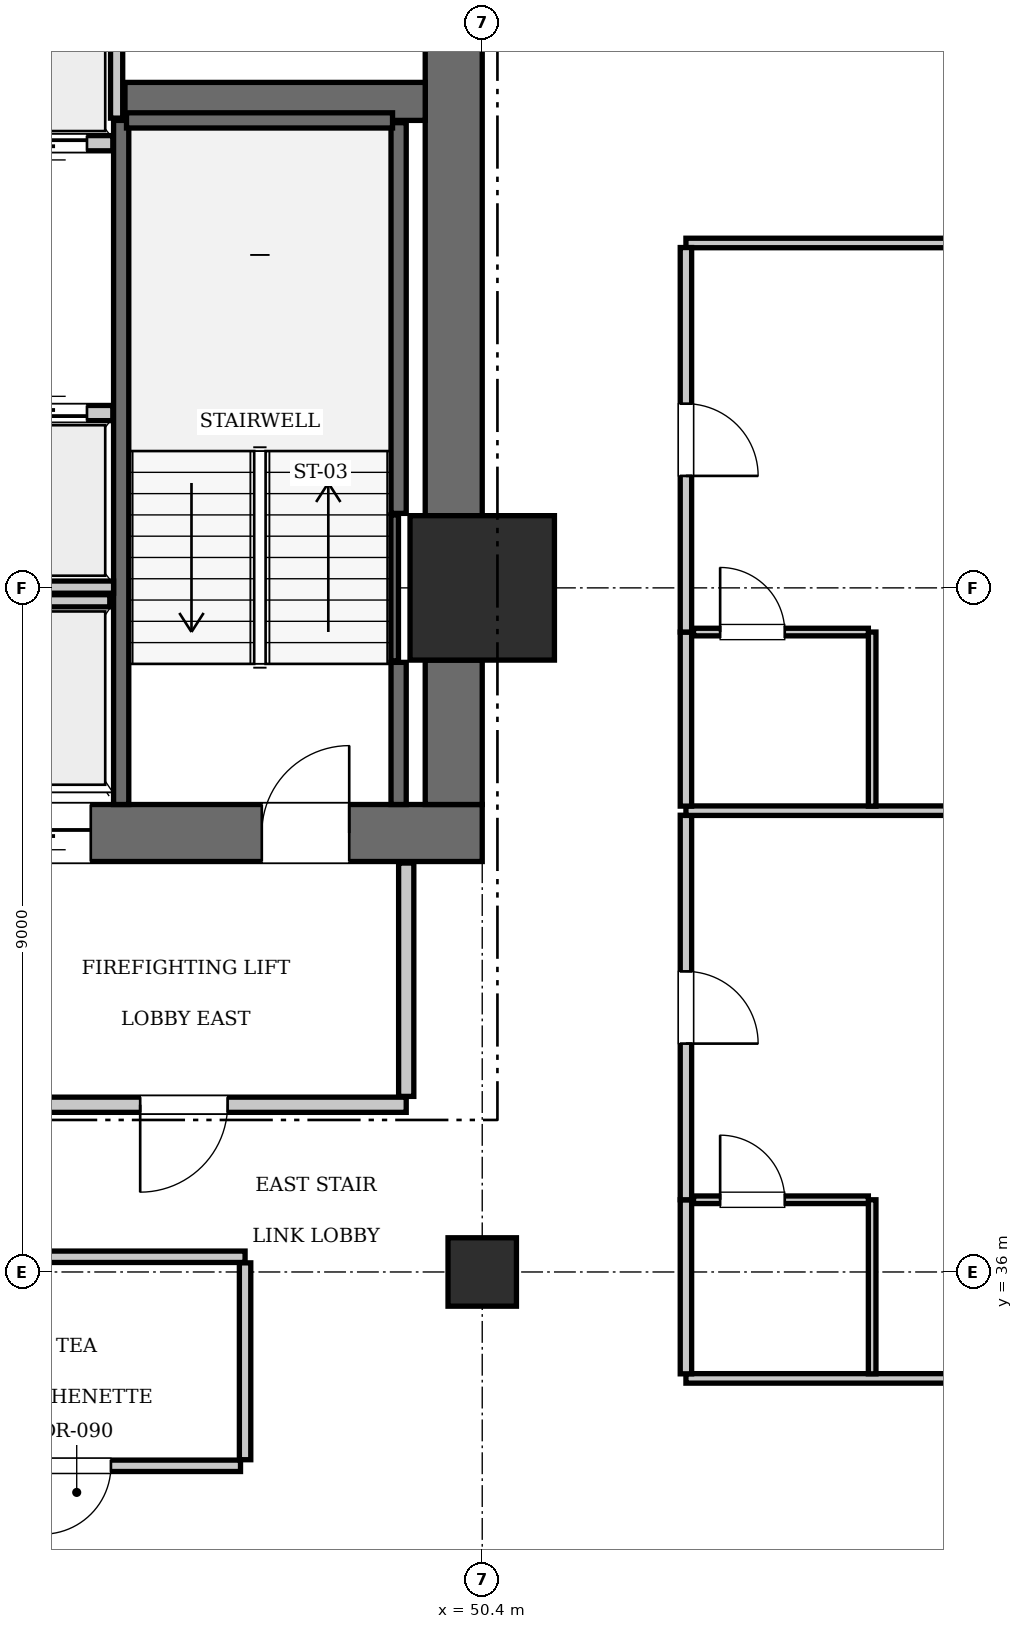
"""IFC4 building model, lengths in metres.
Left out: names, types, materials, properties, quantities, classifications, styles, units other than length and angle.
Written with IfcOpenShell. Run it as: python <this file> out.ifc"""

import sys

from ifc_helpers import new_model, si_unit, direction, frame, frame_2d, origin, origin_2d, place, context, subcontext, project, spatial, rectangle, extrude, element, fill, save


model = new_model("IFC4")
c1 = context("Model", 3, precision=1e-05, world=origin(), true_north=direction((0.0, 1.0)))
c2 = subcontext(c1, "Body", "Model", "MODEL_VIEW")
j1 = project(units=[si_unit("LENGTHUNIT", "METRE"), si_unit("PLANEANGLEUNIT", "RADIAN")], contexts=[c1])
p1 = place(None, origin())
s1 = spatial("IfcSite", under=j1, at=p1, CompositionType="ELEMENT")
p2 = place(p1, origin())
s2 = spatial("IfcBuilding", under=s1, at=p2, CompositionType="ELEMENT")
p3 = place(p2, frame((0.0, 0.0, 154.35)))
s3 = spatial("IfcBuildingStorey", under=s2, at=p3, CompositionType="ELEMENT", Elevation=154.35)
p4 = place(p3, frame((50.4, 45.0, 0.0), z_axis=(0.0, 0.0, 1.0), x_axis=(1.0, 0.0, 0.0)))
e1 = element("IfcColumn", 1, at=p4, inside=s3, PredefinedType="COLUMN", context=c2, shape_type="SweptSolid", body=[
    extrude(rectangle(XDim=1.9, YDim=1.9, at=origin_2d()), origin(), (0.0, 0.0, 1.0), 3.85),
])
p5 = place(p3, frame((43.6, 41.775, 0.0), z_axis=(0.0, 0.0, 1.0), x_axis=(1.0, 0.0, 0.0)))
e2 = element("IfcWall", 2, at=p5, inside=s3, PredefinedType="SHEAR", context=c2, shape_type="SweptSolid", body=[
    extrude(rectangle(XDim=6.8, YDim=0.75, at=frame_2d((3.4, 0.0))), origin(), (0.0, 0.0, 1.0), 3.85),
])
p6 = place(p5, frame((3.9, 0.0, 0.0)))
e3 = element("IfcOpeningElement", 3, at=p6, cuts=e2, PredefinedType="OPENING", context=c2, shape_type="SweptSolid", body=[
    extrude(rectangle(XDim=1.15, YDim=2.15, at=frame_2d((0.575, 1.075))), frame((0.0, 0.385, 0.0), z_axis=(0.0, -1.0, 0.0), x_axis=(1.0, 0.0, 0.0)), (0.0, 0.0, 1.0), 0.77),
])
p7 = place(p5, frame((0.55, 0.0, 0.0)))
e4 = element("IfcOpeningElement", 4, at=p7, cuts=e2, PredefinedType="OPENING", context=c2, shape_type="SweptSolid", body=[
    extrude(rectangle(XDim=1.1, YDim=2.2, at=frame_2d((0.55, 1.1))), frame((0.0, 0.385, 0.0), z_axis=(0.0, -1.0, 0.0), x_axis=(1.0, 0.0, 0.0)), (0.0, 0.0, 1.0), 0.77),
])
p8 = place(p3, frame((50.025, 42.15, 0.0), z_axis=(0.0, 0.0, 1.0), x_axis=(0.0, 1.0, 0.0)))
e5 = element("IfcWall", 5, at=p8, inside=s3, PredefinedType="SHEAR", context=c2, shape_type="SweptSolid", body=[
    extrude(rectangle(XDim=1.9, YDim=0.75, at=frame_2d((0.95, 0.0))), origin(), (0.0, 0.0, 1.0), 3.85),
])
p9 = place(p3, frame((50.025, 45.95, 0.0), z_axis=(0.0, 0.0, 1.0), x_axis=(0.0, 1.0, 0.0)))
e6 = element("IfcWall", 6, at=p9, inside=s3, PredefinedType="SHEAR", context=c2, shape_type="SweptSolid", body=[
    extrude(rectangle(XDim=7.3, YDim=0.75, at=frame_2d((3.65, 0.0))), origin(), (0.0, 0.0, 1.0), 3.85),
])
p10 = place(p3, frame((45.7, 51.4, 0.0), z_axis=(0.0, 0.0, 1.0), x_axis=(1.0, 0.0, 0.0)))
e7 = element("IfcWall", 7, at=p10, inside=s3, PredefinedType="SHEAR", context=c2, shape_type="SweptSolid", body=[
    extrude(rectangle(XDim=3.95, YDim=0.5, at=frame_2d((1.975, 0.0))), origin(), (0.0, 0.0, 1.0), 3.85),
])
p11 = place(p3, frame((50.4, 36.0, 0.0), z_axis=(0.0, 0.0, 1.0), x_axis=(1.0, 0.0, 0.0)))
e8 = element("IfcColumn", 8, at=p11, inside=s3, PredefinedType="COLUMN", context=c2, shape_type="SweptSolid", body=[
    extrude(rectangle(XDim=0.9, YDim=0.9, at=origin_2d()), origin(), (0.0, 0.0, 1.0), 3.85),
])
p12 = place(p3, frame((45.65, 42.15, 0.0), z_axis=(0.0, 0.0, 1.0), x_axis=(0.0, 1.0, 0.0)))
e9 = element("IfcWall", 9, at=p12, inside=s3, PredefinedType="SOLIDWALL", context=c2, shape_type="SweptSolid", body=[
    extrude(rectangle(XDim=9.0, YDim=0.2, at=frame_2d((4.5, 0.0))), origin(), (0.0, 0.0, 1.0), 3.61),
])
p13 = place(p3, frame((49.3, 42.15, 0.0), z_axis=(0.0, 0.0, 1.0), x_axis=(0.0, 1.0, 0.0)))
e10 = element("IfcWall", 10, at=p13, inside=s3, PredefinedType="SOLIDWALL", context=c2, shape_type="SweptSolid", body=[
    extrude(rectangle(XDim=1.87, YDim=0.2, at=frame_2d((0.935, 0.0))), origin(), (0.0, 0.0, 1.0), 3.61),
])
p14 = place(p3, frame((49.3, 45.98, 0.0), z_axis=(0.0, 0.0, 1.0), x_axis=(0.0, 1.0, 0.0)))
e11 = element("IfcWall", 11, at=p14, inside=s3, PredefinedType="SOLIDWALL", context=c2, shape_type="SweptSolid", body=[
    extrude(rectangle(XDim=5.14, YDim=0.2, at=frame_2d((2.57, 0.0))), origin(), (0.0, 0.0, 1.0), 3.61),
])
p15 = place(p3, frame((45.72, 51.15, 0.0), z_axis=(0.0, 0.0, 1.0), x_axis=(1.0, 0.0, 0.0)))
e12 = element("IfcWall", 12, at=p15, inside=s3, PredefinedType="SOLIDWALL", context=c2, shape_type="SweptSolid", body=[
    extrude(rectangle(XDim=3.5, YDim=0.2, at=frame_2d((1.75, 0.0))), origin(), (0.0, 0.0, 1.0), 3.61),
])
p16 = place(p3, frame((49.248, 44.04, 0.0), z_axis=(0.0, 0.0, 1.0), x_axis=(0.0, 1.0, 0.0)))
e13 = element("IfcWall", 13, at=p16, inside=s3, PredefinedType="SOLIDWALL", context=c2, shape_type="SweptSolid", body=[
    extrude(rectangle(XDim=1.92, YDim=0.1, at=frame_2d((0.96, 0.0))), origin(), (0.0, 0.0, 1.0), 3.61),
])
p17 = place(p3, frame((43.86, 47.3, 0.0), z_axis=(0.0, 0.0, 1.0), x_axis=(1.0, 0.0, 0.0)))
e14 = element("IfcWall", 14, at=p17, inside=s3, PredefinedType="SOLIDWALL", context=c2, shape_type="SweptSolid", body=[
    extrude(rectangle(XDim=1.68, YDim=0.2, at=frame_2d((0.84, 0.0))), origin(), (0.0, 0.0, 1.0), 3.61),
])
p18 = place(p17, frame((0.34, 0.0, 0.0)))
e15 = element("IfcOpeningElement", 15, at=p18, cuts=e14, PredefinedType="OPENING", context=c2, shape_type="SweptSolid", body=[
    extrude(rectangle(XDim=1.0, YDim=2.15, at=frame_2d((0.5, 1.075))), frame((0.0, 0.11, 0.0), z_axis=(0.0, -1.0, 0.0), x_axis=(1.0, 0.0, 0.0)), (0.0, 0.0, 1.0), 0.22),
])
p19 = place(p3, frame((43.86, 50.85, 0.0), z_axis=(0.0, 0.0, 1.0), x_axis=(1.0, 0.0, 0.0)))
e16 = element("IfcWall", 16, at=p19, inside=s3, PredefinedType="SOLIDWALL", context=c2, shape_type="SweptSolid", body=[
    extrude(rectangle(XDim=1.68, YDim=0.2, at=frame_2d((0.84, 0.0))), origin(), (0.0, 0.0, 1.0), 3.61),
])
p20 = place(p19, frame((0.34, 0.0, 0.0)))
e17 = element("IfcOpeningElement", 17, at=p20, cuts=e16, PredefinedType="OPENING", context=c2, shape_type="SweptSolid", body=[
    extrude(rectangle(XDim=1.0, YDim=2.15, at=frame_2d((0.5, 1.075))), frame((0.0, 0.11, 0.0), z_axis=(0.0, -1.0, 0.0), x_axis=(1.0, 0.0, 0.0)), (0.0, 0.0, 1.0), 0.22),
])
p21 = place(p3, frame((43.9, 44.83, 0.0), z_axis=(0.0, 0.0, 1.0), x_axis=(1.0, 0.0, 0.0)))
e18 = element("IfcWall", 18, at=p21, inside=s3, PredefinedType="SOLIDWALL", context=c2, shape_type="SweptSolid", body=[
    extrude(rectangle(XDim=1.6, YDim=0.16, at=frame_2d((0.8, 0.0))), origin(), (0.0, 0.0, 1.0), 3.61),
])
p22 = place(p3, frame((42.1, 45.01, 0.0), z_axis=(0.0, 0.0, 1.0), x_axis=(1.0, 0.0, 0.0)))
e19 = element("IfcWall", 19, at=p22, inside=s3, PredefinedType="SOLIDWALL", context=c2, shape_type="SweptSolid", body=[
    extrude(rectangle(XDim=3.45, YDim=0.16, at=frame_2d((1.725, 0.0))), origin(), (0.0, 0.0, 1.0), 3.61),
])
p23 = place(p3, frame((45.59, 51.18, 0.0), z_axis=(0.0, 0.0, 1.0), x_axis=(0.0, 1.0, 0.0)))
e20 = element("IfcWall", 20, at=p23, inside=s3, PredefinedType="SOLIDWALL", context=c2, shape_type="SweptSolid", body=[
    extrude(rectangle(XDim=2.07, YDim=0.16, at=frame_2d((1.035, 0.0))), origin(), (0.0, 0.0, 1.0), 3.61),
])
p24 = place(p3, frame((43.6, 38.2, 0.0), z_axis=(0.0, 0.0, 1.0), x_axis=(1.0, 0.0, 0.0)))
e21 = element("IfcWall", 21, at=p24, inside=s3, PredefinedType="PARTITIONING", context=c2, shape_type="SweptSolid", body=[
    extrude(rectangle(XDim=5.8, YDim=0.2, at=frame_2d((2.9, 0.0))), origin(), (0.0, 0.0, 1.0), 3.61),
])
p25 = place(p24, frame((2.3, 0.0, 0.0)))
e22 = element("IfcOpeningElement", 22, at=p25, cuts=e21, PredefinedType="OPENING", context=c2, shape_type="SweptSolid", body=[
    extrude(rectangle(XDim=1.15, YDim=2.15, at=frame_2d((0.575, 1.075))), frame((0.0, 0.11, 0.0), z_axis=(0.0, -1.0, 0.0), x_axis=(1.0, 0.0, 0.0)), (0.0, 0.0, 1.0), 0.22),
])
p26 = place(p3, frame((49.4, 38.31, 0.0), z_axis=(0.0, 0.0, 1.0), x_axis=(0.0, 1.0, 0.0)))
e23 = element("IfcWall", 23, at=p26, inside=s3, PredefinedType="PARTITIONING", context=c2, shape_type="SweptSolid", body=[
    extrude(rectangle(XDim=3.07, YDim=0.2, at=frame_2d((1.535, 0.0))), origin(), (0.0, 0.0, 1.0), 3.61),
])
p27 = place(p3, frame((42.85, 36.2, 0.0), z_axis=(0.0, 0.0, 1.0), x_axis=(1.0, 0.0, 0.0)))
e24 = element("IfcWall", 24, at=p27, inside=s3, PredefinedType="PARTITIONING", context=c2, shape_type="SweptSolid", body=[
    extrude(rectangle(XDim=4.43, YDim=0.15, at=frame_2d((2.215, 0.0))), origin(), (0.0, 0.0, 1.0), 3.61),
])
p28 = place(p3, frame((47.28, 33.53, 0.0), z_axis=(0.0, 0.0, 1.0), x_axis=(0.0, 1.0, 0.0)))
e25 = element("IfcWall", 25, at=p28, inside=s3, PredefinedType="PARTITIONING", context=c2, shape_type="SweptSolid", body=[
    extrude(rectangle(XDim=2.59, YDim=0.15, at=frame_2d((1.295, 0.0))), origin(), (0.0, 0.0, 1.0), 3.61),
])
p29 = place(p3, frame((42.91, 33.45, 0.0), z_axis=(0.0, 0.0, 1.0), x_axis=(1.0, 0.0, 0.0)))
e26 = element("IfcWall", 26, at=p29, inside=s3, PredefinedType="PARTITIONING", context=c2, shape_type="SweptSolid", body=[
    extrude(rectangle(XDim=4.31, YDim=0.15, at=frame_2d((2.155, 0.0))), origin(), (0.0, 0.0, 1.0), 3.61),
])
p30 = place(p29, frame((1.705, 0.0, 0.0)))
e27 = element("IfcOpeningElement", 27, at=p30, cuts=e26, PredefinedType="OPENING", context=c2, shape_type="SweptSolid", body=[
    extrude(rectangle(XDim=0.9, YDim=2.1, at=frame_2d((0.45, 1.05))), frame((0.0, 0.085, 0.0), z_axis=(0.0, -1.0, 0.0), x_axis=(1.0, 0.0, 0.0)), (0.0, 0.0, 1.0), 0.17),
])
p31 = place(p3, frame((53.08, 34.6, 0.0), z_axis=(0.0, 0.0, 1.0), x_axis=(1.0, 0.0, 0.0)))
e28 = element("IfcWall", 28, at=p31, inside=s3, PredefinedType="PARTITIONING", context=c2, shape_type="SweptSolid", body=[
    extrude(rectangle(XDim=9.32, YDim=0.125, at=frame_2d((4.66, 0.0))), origin(), (0.0, 0.0, 1.0), 3.61),
])
p32 = place(p3, frame((53.08, 49.538, 0.0), z_axis=(0.0, 0.0, 1.0), x_axis=(1.0, 0.0, 0.0)))
e29 = element("IfcWall", 29, at=p32, inside=s3, PredefinedType="PARTITIONING", context=c2, shape_type="SweptSolid", body=[
    extrude(rectangle(XDim=5.28, YDim=0.125, at=frame_2d((2.64, 0.0))), origin(), (0.0, 0.0, 1.0), 3.61),
])
p33 = place(p3, frame((53.08, 34.66, 0.0), z_axis=(0.0, 0.0, 1.0), x_axis=(0.0, 1.0, 0.0)))
e30 = element("IfcWall", 30, at=p33, inside=s3, PredefinedType="PARTITIONING", context=c2, shape_type="SweptSolid", body=[
    extrude(rectangle(XDim=2.29, YDim=0.15, at=frame_2d((1.145, 0.0))), origin(), (0.0, 0.0, 1.0), 3.61),
])
p34 = place(p3, frame((53.08, 36.95, 0.0), z_axis=(0.0, 0.0, 1.0), x_axis=(0.0, 1.0, 0.0)))
e31 = element("IfcWall", 31, at=p34, inside=s3, PredefinedType="PARTITIONING", context=c2, shape_type="SweptSolid", body=[
    extrude(rectangle(XDim=5.059, YDim=0.15, at=frame_2d((2.529, 0.0))), origin(), (0.0, 0.0, 1.0), 3.61),
])
p35 = place(p34, frame((2.054, 0.0, 0.0)))
e32 = element("IfcOpeningElement", 32, at=p35, cuts=e31, PredefinedType="OPENING", context=c2, shape_type="SweptSolid", body=[
    extrude(rectangle(XDim=0.95, YDim=2.15, at=frame_2d((0.475, 1.075))), frame((0.0, 0.085, 0.0), z_axis=(0.0, -1.0, 0.0), x_axis=(1.0, 0.0, 0.0)), (0.0, 0.0, 1.0), 0.17),
])
p36 = place(p3, frame((55.53, 34.66, 0.0), z_axis=(0.0, 0.0, 1.0), x_axis=(0.0, 1.0, 0.0)))
e33 = element("IfcWall", 33, at=p36, inside=s3, PredefinedType="PARTITIONING", context=c2, shape_type="SweptSolid", body=[
    extrude(rectangle(XDim=2.29, YDim=0.1, at=frame_2d((1.145, 0.0))), origin(), (0.0, 0.0, 1.0), 3.61),
])
p37 = place(p3, frame((53.18, 36.95, 0.0), z_axis=(0.0, 0.0, 1.0), x_axis=(1.0, 0.0, 0.0)))
e34 = element("IfcWall", 34, at=p37, inside=s3, PredefinedType="PARTITIONING", context=c2, shape_type="SweptSolid", body=[
    extrude(rectangle(XDim=2.3, YDim=0.1, at=frame_2d((1.15, 0.0))), origin(), (0.0, 0.0, 1.0), 3.61),
])
p38 = place(p37, frame((0.35, 0.0, 0.0)))
e35 = element("IfcOpeningElement", 35, at=p38, cuts=e34, PredefinedType="OPENING", context=c2, shape_type="SweptSolid", body=[
    extrude(rectangle(XDim=0.85, YDim=2.1, at=frame_2d((0.425, 1.05))), frame((0.0, 0.06, 0.0), z_axis=(0.0, -1.0, 0.0), x_axis=(1.0, 0.0, 0.0)), (0.0, 0.0, 1.0), 0.12),
])
p39 = place(p3, frame((53.08, 42.069, 0.0), z_axis=(0.0, 0.0, 1.0), x_axis=(1.0, 0.0, 0.0)))
e36 = element("IfcWall", 36, at=p39, inside=s3, PredefinedType="PARTITIONING", context=c2, shape_type="SweptSolid", body=[
    extrude(rectangle(XDim=9.32, YDim=0.125, at=frame_2d((4.66, 0.0))), origin(), (0.0, 0.0, 1.0), 3.61),
])
p40 = place(p3, frame((53.08, 42.129, 0.0), z_axis=(0.0, 0.0, 1.0), x_axis=(0.0, 1.0, 0.0)))
e37 = element("IfcWall", 37, at=p40, inside=s3, PredefinedType="PARTITIONING", context=c2, shape_type="SweptSolid", body=[
    extrude(rectangle(XDim=2.29, YDim=0.15, at=frame_2d((1.145, 0.0))), origin(), (0.0, 0.0, 1.0), 3.61),
])
p41 = place(p3, frame((53.08, 44.419, 0.0), z_axis=(0.0, 0.0, 1.0), x_axis=(0.0, 1.0, 0.0)))
e38 = element("IfcWall", 38, at=p41, inside=s3, PredefinedType="PARTITIONING", context=c2, shape_type="SweptSolid", body=[
    extrude(rectangle(XDim=5.059, YDim=0.15, at=frame_2d((2.529, 0.0))), origin(), (0.0, 0.0, 1.0), 3.61),
])
p42 = place(p41, frame((2.054, 0.0, 0.0)))
e39 = element("IfcOpeningElement", 39, at=p42, cuts=e38, PredefinedType="OPENING", context=c2, shape_type="SweptSolid", body=[
    extrude(rectangle(XDim=0.95, YDim=2.15, at=frame_2d((0.475, 1.075))), frame((0.0, 0.085, 0.0), z_axis=(0.0, -1.0, 0.0), x_axis=(1.0, 0.0, 0.0)), (0.0, 0.0, 1.0), 0.17),
])
p43 = place(p3, frame((55.53, 42.129, 0.0), z_axis=(0.0, 0.0, 1.0), x_axis=(0.0, 1.0, 0.0)))
e40 = element("IfcWall", 40, at=p43, inside=s3, PredefinedType="PARTITIONING", context=c2, shape_type="SweptSolid", body=[
    extrude(rectangle(XDim=2.29, YDim=0.1, at=frame_2d((1.145, 0.0))), origin(), (0.0, 0.0, 1.0), 3.61),
])
p44 = place(p3, frame((53.18, 44.419, 0.0), z_axis=(0.0, 0.0, 1.0), x_axis=(1.0, 0.0, 0.0)))
e41 = element("IfcWall", 41, at=p44, inside=s3, PredefinedType="PARTITIONING", context=c2, shape_type="SweptSolid", body=[
    extrude(rectangle(XDim=2.3, YDim=0.1, at=frame_2d((1.15, 0.0))), origin(), (0.0, 0.0, 1.0), 3.61),
])
p45 = place(p44, frame((0.35, 0.0, 0.0)))
e42 = element("IfcOpeningElement", 42, at=p45, cuts=e41, PredefinedType="OPENING", context=c2, shape_type="SweptSolid", body=[
    extrude(rectangle(XDim=0.85, YDim=2.1, at=frame_2d((0.425, 1.05))), frame((0.0, 0.06, 0.0), z_axis=(0.0, -1.0, 0.0), x_axis=(1.0, 0.0, 0.0)), (0.0, 0.0, 1.0), 0.12),
])
p46 = place(p6, origin())
e43 = element("IfcDoor", 43, at=p46, inside=s3, OperationType="SINGLE_SWING_RIGHT", PredefinedType="DOOR", context=c2, shape_type="SweptSolid", body=[
    extrude(rectangle(XDim=1.15, YDim=2.15, at=frame_2d((0.575, 1.075))), frame((0.0, 0.025, 0.0), z_axis=(0.0, -1.0, 0.0), x_axis=(1.0, 0.0, 0.0)), (0.0, 0.0, 1.0), 0.05),
])
fill(e3, e43)
p47 = place(p18, origin())
e44 = element("IfcDoor", 44, at=p47, inside=s3, OperationType="SLIDING_TO_LEFT", PredefinedType="DOOR", context=c2, shape_type="SweptSolid", body=[
    extrude(rectangle(XDim=1.0, YDim=2.15, at=frame_2d((0.5, 1.075))), frame((0.0, 0.025, 0.0), z_axis=(0.0, -1.0, 0.0), x_axis=(1.0, 0.0, 0.0)), (0.0, 0.0, 1.0), 0.05),
])
fill(e15, e44)
p48 = place(p20, frame((1.0, 0.0, 0.0), z_axis=(0.0, 0.0, 1.0), x_axis=(-1.0, 0.0, 0.0)))
e45 = element("IfcDoor", 45, at=p48, inside=s3, OperationType="SLIDING_TO_LEFT", PredefinedType="DOOR", context=c2, shape_type="SweptSolid", body=[
    extrude(rectangle(XDim=1.0, YDim=2.15, at=frame_2d((0.5, 1.075))), frame((0.0, 0.025, 0.0), z_axis=(0.0, -1.0, 0.0), x_axis=(1.0, 0.0, 0.0)), (0.0, 0.0, 1.0), 0.05),
])
fill(e17, e45)
p49 = place(p7, frame((1.1, 0.0, 0.0), z_axis=(0.0, 0.0, 1.0), x_axis=(-1.0, 0.0, 0.0)))
e46 = element("IfcDoor", 46, at=p49, inside=s3, OperationType="SLIDING_TO_LEFT", PredefinedType="DOOR", context=c2, shape_type="SweptSolid", body=[
    extrude(rectangle(XDim=1.1, YDim=2.2, at=frame_2d((0.55, 1.1))), frame((0.0, 0.025, 0.0), z_axis=(0.0, -1.0, 0.0), x_axis=(1.0, 0.0, 0.0)), (0.0, 0.0, 1.0), 0.05),
])
fill(e4, e46)
p50 = place(p25, frame((1.15, 0.0, 0.0), z_axis=(0.0, 0.0, 1.0), x_axis=(-1.0, 0.0, 0.0)))
e47 = element("IfcDoor", 47, at=p50, inside=s3, OperationType="SINGLE_SWING_RIGHT", PredefinedType="DOOR", context=c2, shape_type="SweptSolid", body=[
    extrude(rectangle(XDim=1.15, YDim=2.15, at=frame_2d((0.575, 1.075))), frame((0.0, 0.025, 0.0), z_axis=(0.0, -1.0, 0.0), x_axis=(1.0, 0.0, 0.0)), (0.0, 0.0, 1.0), 0.05),
])
fill(e22, e47)
p51 = place(p30, frame((0.9, 0.0, 0.0), z_axis=(0.0, 0.0, 1.0), x_axis=(-1.0, 0.0, 0.0)))
e48 = element("IfcDoor", 48, at=p51, inside=s3, OperationType="SINGLE_SWING_RIGHT", PredefinedType="DOOR", context=c2, shape_type="SweptSolid", body=[
    extrude(rectangle(XDim=0.9, YDim=2.1, at=frame_2d((0.45, 1.05))), frame((0.0, 0.025, 0.0), z_axis=(0.0, -1.0, 0.0), x_axis=(1.0, 0.0, 0.0)), (0.0, 0.0, 1.0), 0.05),
])
fill(e27, e48)
p52 = place(p38, origin())
e49 = element("IfcDoor", 49, at=p52, inside=s3, OperationType="SINGLE_SWING_LEFT", PredefinedType="DOOR", context=c2, shape_type="SweptSolid", body=[
    extrude(rectangle(XDim=0.85, YDim=2.1, at=frame_2d((0.425, 1.05))), frame((0.0, 0.025, 0.0), z_axis=(0.0, -1.0, 0.0), x_axis=(1.0, 0.0, 0.0)), (0.0, 0.0, 1.0), 0.05),
])
fill(e35, e49)
p53 = place(p35, frame((0.95, 0.0, 0.0), z_axis=(0.0, 0.0, 1.0), x_axis=(-1.0, 0.0, 0.0)))
e50 = element("IfcDoor", 50, at=p53, inside=s3, OperationType="SINGLE_SWING_RIGHT", PredefinedType="DOOR", context=c2, shape_type="SweptSolid", body=[
    extrude(rectangle(XDim=0.95, YDim=2.15, at=frame_2d((0.475, 1.075))), frame((0.0, 0.025, 0.0), z_axis=(0.0, -1.0, 0.0), x_axis=(1.0, 0.0, 0.0)), (0.0, 0.0, 1.0), 0.05),
])
fill(e32, e50)
p54 = place(p45, origin())
e51 = element("IfcDoor", 51, at=p54, inside=s3, OperationType="SINGLE_SWING_LEFT", PredefinedType="DOOR", context=c2, shape_type="SweptSolid", body=[
    extrude(rectangle(XDim=0.85, YDim=2.1, at=frame_2d((0.425, 1.05))), frame((0.0, 0.025, 0.0), z_axis=(0.0, -1.0, 0.0), x_axis=(1.0, 0.0, 0.0)), (0.0, 0.0, 1.0), 0.05),
])
fill(e42, e51)
p55 = place(p42, frame((0.95, 0.0, 0.0), z_axis=(0.0, 0.0, 1.0), x_axis=(-1.0, 0.0, 0.0)))
e52 = element("IfcDoor", 52, at=p55, inside=s3, OperationType="SINGLE_SWING_RIGHT", PredefinedType="DOOR", context=c2, shape_type="SweptSolid", body=[
    extrude(rectangle(XDim=0.95, YDim=2.15, at=frame_2d((0.475, 1.075))), frame((0.0, 0.025, 0.0), z_axis=(0.0, -1.0, 0.0), x_axis=(1.0, 0.0, 0.0)), (0.0, 0.0, 1.0), 0.05),
])
fill(e39, e52)
save(model, sys.argv[1])
